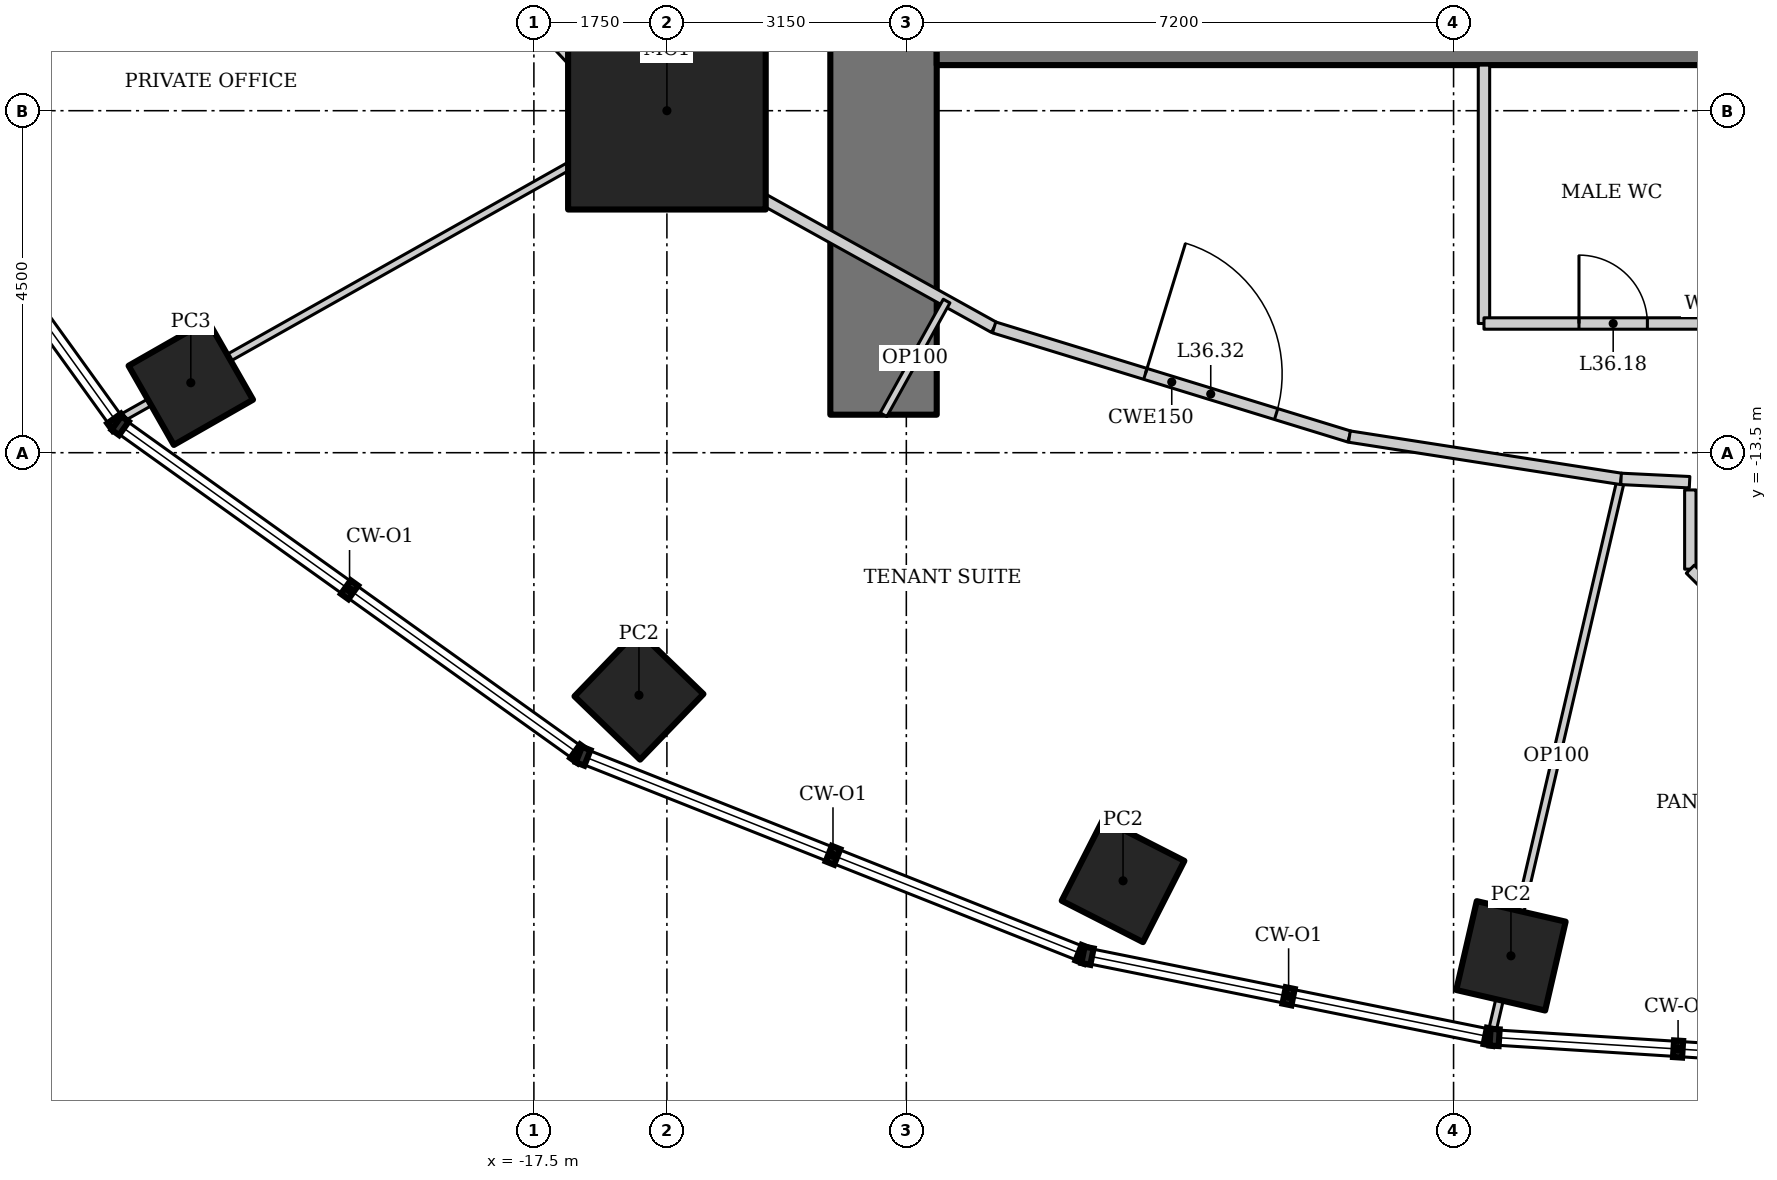
"""IFC4 building model, lengths in metres.
Left out: names, types, materials, properties, quantities, classifications, styles, units other than length and angle.
Written with IfcOpenShell. Run it as: python <this file> out.ifc"""

import sys

from ifc_helpers import new_model, si_unit, direction, frame, frame_2d, origin, origin_2d, place, context, subcontext, project, spatial, rectangle, hollow_rectangle, extrude, element, fill, save


model = new_model("IFC4")
c1 = context("Model", 3, precision=1e-05, world=origin(), true_north=direction((0.0, 1.0)))
c2 = subcontext(c1, "Body", "Model", "MODEL_VIEW")
j1 = project(units=[si_unit("LENGTHUNIT", "METRE"), si_unit("PLANEANGLEUNIT", "RADIAN")], contexts=[c1])
p1 = place(None, origin())
s1 = spatial("IfcSite", under=j1, at=p1, CompositionType="ELEMENT")
p2 = place(p1, origin())
s2 = spatial("IfcBuilding", under=s1, at=p2, CompositionType="ELEMENT")
p3 = place(p2, frame((0.0, 0.0, 155.2)))
s3 = spatial("IfcBuildingStorey", under=s2, at=p3, CompositionType="ELEMENT", Elevation=155.2)
p4 = place(p3, frame((-15.75, -9.0, 0.0), z_axis=(0.0, 0.0, 1.0), x_axis=(1.0, 0.0, 0.0)))
e1 = element("IfcColumn", 1, at=p4, inside=s3, PredefinedType="COLUMN", context=c2, shape_type="SweptSolid", body=[
    extrude(hollow_rectangle(XDim=2.6, YDim=2.6, WallThickness=0.13, at=origin_2d()), origin(), (0.0, 0.0, 1.0), 4.2),
])
p5 = place(p3, frame((-22.014, -12.579, 0.0), z_axis=(0.0, 0.0, 1.0), x_axis=(0.86824298017, 0.496139221777, 0.0)))
e2 = element("IfcColumn", 2, at=p5, inside=s3, PredefinedType="COLUMN", context=c2, shape_type="SweptSolid", body=[
    extrude(hollow_rectangle(XDim=1.2, YDim=1.2, WallThickness=0.12, at=origin_2d()), origin(), (0.0, 0.0, 1.0), 4.2),
])
for number, where, z_axis, x_axis in (
    (3, (-16.118, -16.69, 0.0), (0.0, 0.0, 1.0), (0.695, 0.719, 0.0)),
    (4, (-9.749, -19.133, 0.0), (0.0, 0.0, 1.0), (0.454, 0.891, 0.0)),
    (5, (-4.645, -20.12, 0.0), (0.0, 0.0, 1.0), (0.225, 0.974, 0.0)),
):
    element("IfcColumn", number, at=place(p3, frame(where, z_axis=z_axis, x_axis=x_axis)), inside=s3, PredefinedType="COLUMN", context=c2, shape_type="SweptSolid", body=[
        extrude(hollow_rectangle(XDim=1.2, YDim=1.2, WallThickness=0.1, at=origin_2d()), origin(), (0.0, 0.0, 1.0), 4.2),
    ])
p6 = place(p3, frame((-12.9, 13.0, 0.0), z_axis=(0.0, 0.0, 1.0), x_axis=(0.0, -1.0, 0.0)))
e6 = element("IfcWall", 6, at=p6, inside=s3, PredefinedType="SHEAR", context=c2, shape_type="SweptSolid", body=[
    extrude(rectangle(XDim=26.0, YDim=1.4, at=frame_2d((13.0, 0.0))), origin(), (0.0, 0.0, 1.0), 4.2),
])
p7 = place(p6, frame((12.1, 0.0, 0.0)))
e7 = element("IfcOpeningElement", 7, at=p7, cuts=e6, PredefinedType="OPENING", context=c2, shape_type="SweptSolid", body=[
    extrude(rectangle(XDim=1.8, YDim=2.1, at=frame_2d((0.9, 1.05))), frame((0.0, 0.71, 0.0), z_axis=(0.0, -1.0, 0.0), x_axis=(1.0, 0.0, 0.0)), (0.0, 0.0, 1.0), 1.42),
])
p8 = place(p3, frame((-12.2, -7.6, 0.0), z_axis=(0.0, 0.0, 1.0), x_axis=(1.0, 0.0, 0.0)))
e8 = element("IfcWall", 8, at=p8, inside=s3, PredefinedType="SHEAR", context=c2, shape_type="SweptSolid", body=[
    extrude(rectangle(XDim=24.4, YDim=1.6, at=frame_2d((12.2, 0.0))), origin(), (0.0, 0.0, 1.0), 4.2),
])
p9 = place(p3, frame((-22.949, -13.059, 0.0), z_axis=(0.0, 0.0, 1.0), x_axis=(0.871274989434, 0.490795163777, 0.0)))
e9 = element("IfcWall", 9, at=p9, inside=s3, PredefinedType="PARTITIONING", context=c2, shape_type="SweptSolid", body=[
    extrude(rectangle(XDim=7.792, YDim=0.1, at=frame_2d((3.896, 0.0))), origin(), (0.0, 0.0, 1.0), 3.451),
])
p10 = place(p3, frame((-4.897, -21.135, 0.0), z_axis=(0.0, 0.0, 1.0), x_axis=(0.227181159974, 0.973852514785, 0.0)))
e10 = element("IfcWall", 10, at=p10, inside=s3, PredefinedType="PARTITIONING", context=c2, shape_type="SweptSolid", body=[
    extrude(rectangle(XDim=7.486, YDim=0.1, at=frame_2d((3.743, 0.0))), origin(), (0.0, 0.0, 1.0), 3.293),
])
p11 = place(p3, frame((-20.078, -5.006, 0.0), z_axis=(0.0, 0.0, 1.0), x_axis=(0.679724658223, -0.733467374191, 0.0)))
e11 = element("IfcWall", 11, at=p11, inside=s3, PredefinedType="PARTITIONING", context=c2, shape_type="SweptSolid", body=[
    extrude(rectangle(XDim=5.765, YDim=0.15, at=frame_2d((2.882, 0.0))), origin(), (0.0, 0.0, 1.0), 4.05),
])
p12 = place(p11, frame((0.15, 0.0, 0.0)))
e12 = element("IfcOpeningElement", 12, at=p12, cuts=e11, PredefinedType="OPENING", context=c2, shape_type="SweptSolid", body=[
    extrude(rectangle(XDim=0.9, YDim=2.1, at=frame_2d((0.45, 1.05))), frame((0.0, 0.085, 0.0), z_axis=(0.0, -1.0, 0.0), x_axis=(1.0, 0.0, 0.0)), (0.0, 0.0, 1.0), 0.17),
])
p13 = place(p3, frame((-16.16, -9.234, 0.0), z_axis=(0.0, 0.0, 1.0), x_axis=(0.87433873028, -0.485316169865, 0.0)))
e13 = element("IfcWall", 13, at=p13, inside=s3, PredefinedType="PARTITIONING", context=c2, shape_type="SweptSolid", body=[
    extrude(rectangle(XDim=5.393, YDim=0.15, at=frame_2d((2.696, 0.0))), origin(), (0.0, 0.0, 1.0), 4.05),
])
p14 = place(p3, frame((-11.445, -11.852, 0.0), z_axis=(0.0, 0.0, 1.0), x_axis=(0.955892284323, -0.293717450573, 0.0)))
e14 = element("IfcWall", 14, at=p14, inside=s3, PredefinedType="PARTITIONING", context=c2, shape_type="SweptSolid", body=[
    extrude(rectangle(XDim=4.89, YDim=0.15, at=frame_2d((2.445, 0.0))), origin(), (0.0, 0.0, 1.0), 4.05),
])
p15 = place(p14, frame((2.082, 0.0, 0.0)))
e15 = element("IfcOpeningElement", 15, at=p15, cuts=e14, PredefinedType="OPENING", context=c2, shape_type="SweptSolid", body=[
    extrude(rectangle(XDim=1.8, YDim=2.1, at=frame_2d((0.9, 1.05))), frame((0.0, 0.085, 0.0), z_axis=(0.0, -1.0, 0.0), x_axis=(1.0, 0.0, 0.0)), (0.0, 0.0, 1.0), 0.17),
])
p16 = place(p3, frame((-6.771, -13.288, 0.0), z_axis=(0.0, 0.0, 1.0), x_axis=(0.98808911792, -0.153882731479, 0.0)))
e16 = element("IfcWall", 16, at=p16, inside=s3, PredefinedType="PARTITIONING", context=c2, shape_type="SweptSolid", body=[
    extrude(rectangle(XDim=3.617, YDim=0.15, at=frame_2d((1.809, 0.0))), origin(), (0.0, 0.0, 1.0), 4.05),
])
p17 = place(p3, frame((-5.0, -8.4, 0.0), z_axis=(0.0, 0.0, 1.0), x_axis=(0.0, -1.0, 0.0)))
e17 = element("IfcWall", 17, at=p17, inside=s3, PredefinedType="SOLIDWALL", context=c2, shape_type="SweptSolid", body=[
    extrude(rectangle(XDim=3.4, YDim=0.15, at=frame_2d((1.7, 0.0))), origin(), (0.0, 0.0, 1.0), 4.05),
])
p18 = place(p3, frame((-12.9, -13.0, 0.0), z_axis=(0.0, 0.0, 1.0), x_axis=(0.485339901234, 0.87432555737, 0.0)))
e18 = element("IfcWall", 18, at=p18, inside=s3, PredefinedType="PARTITIONING", context=c2, shape_type="SweptSolid", body=[
    extrude(rectangle(XDim=1.71, YDim=0.1, at=frame_2d((0.855, 0.0))), origin(), (0.0, 0.0, 1.0), 4.05),
])
p19 = place(p3, frame((-3.196, -13.844, 0.0), z_axis=(0.0, 0.0, 1.0), x_axis=(0.998826757305, -0.048426324366, 0.0)))
e19 = element("IfcWall", 19, at=p19, inside=s3, PredefinedType="PARTITIONING", context=c2, shape_type="SweptSolid", body=[
    extrude(rectangle(XDim=0.902, YDim=0.15, at=frame_2d((0.451, 0.0))), origin(), (0.0, 0.0, 1.0), 4.05),
])
p20 = place(p3, frame((-5.0, -11.8, 0.0), z_axis=(0.0, 0.0, 1.0), x_axis=(1.0, 0.0, 0.0)))
e20 = element("IfcWall", 20, at=p20, inside=s3, PredefinedType="SOLIDWALL", context=c2, shape_type="SweptSolid", body=[
    extrude(rectangle(XDim=2.869, YDim=0.15, at=frame_2d((1.434, 0.0))), origin(), (0.0, 0.0, 1.0), 4.05),
])
p21 = place(p20, frame((1.25, 0.0, 0.0)))
e21 = element("IfcOpeningElement", 21, at=p21, cuts=e20, PredefinedType="OPENING", context=c2, shape_type="SweptSolid", body=[
    extrude(rectangle(XDim=0.9, YDim=2.1, at=frame_2d((0.45, 1.05))), frame((0.0, 0.085, 0.0), z_axis=(0.0, -1.0, 0.0), x_axis=(1.0, 0.0, 0.0)), (0.0, 0.0, 1.0), 0.17),
])
p22 = place(p3, frame((-2.285, -15.032, 0.0), z_axis=(0.0, 0.0, 1.0), x_axis=(0.0, 1.0, 0.0)))
e22 = element("IfcWall", 22, at=p22, inside=s3, PredefinedType="PARTITIONING", context=c2, shape_type="SweptSolid", body=[
    extrude(rectangle(XDim=1.042, YDim=0.15, at=frame_2d((0.521, 0.0))), origin(), (0.0, 0.0, 1.0), 4.05),
])
p23 = place(p3, frame((-1.532, -15.785, 0.0), z_axis=(0.0, 0.0, 1.0), x_axis=(-0.707106781187, 0.707106781187, 0.0)))
e23 = element("IfcWall", 23, at=p23, inside=s3, PredefinedType="PARTITIONING", context=c2, shape_type="SweptSolid", body=[
    extrude(rectangle(XDim=1.064, YDim=0.15, at=frame_2d((0.532, 0.0))), origin(), (0.0, 0.0, 1.0), 4.05),
])
p24 = place(p21, origin())
e24 = element("IfcDoor", 24, at=p24, inside=s3, OperationType="SINGLE_SWING_LEFT", PredefinedType="DOOR", context=c2, shape_type="SweptSolid", body=[
    extrude(rectangle(XDim=0.9, YDim=2.1, at=frame_2d((0.45, 1.05))), frame((0.0, 0.025, 0.0), z_axis=(0.0, -1.0, 0.0), x_axis=(1.0, 0.0, 0.0)), (0.0, 0.0, 1.0), 0.05),
])
fill(e21, e24)
p25 = place(p15, origin())
e25 = element("IfcDoor", 25, at=p25, inside=s3, OperationType="DOUBLE_DOOR_DOUBLE_SWING", PredefinedType="DOOR", context=c2, shape_type="SweptSolid", body=[
    extrude(rectangle(XDim=1.8, YDim=2.1, at=frame_2d((0.9, 1.05))), frame((0.0, 0.025, 0.0), z_axis=(0.0, -1.0, 0.0), x_axis=(1.0, 0.0, 0.0)), (0.0, 0.0, 1.0), 0.05),
])
fill(e15, e25)
save(model, sys.argv[1])
